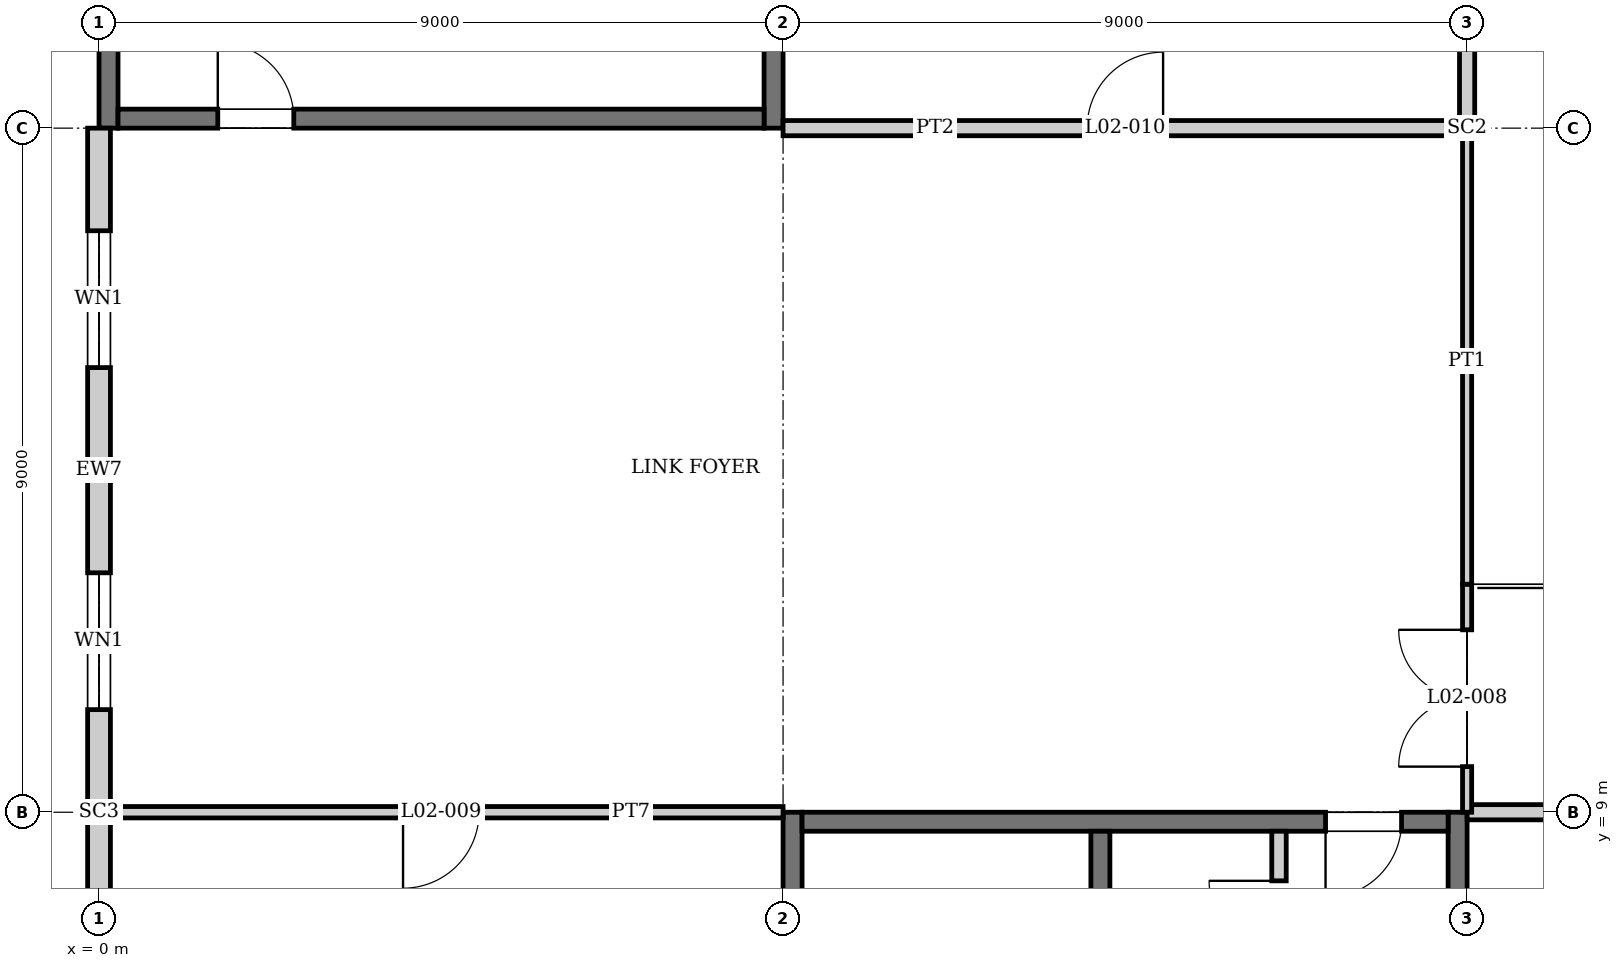
"""IFC4 building model, lengths in metres.
Left out: names, types, materials, properties, quantities, classifications, styles, units other than length and angle.
Written with IfcOpenShell. Run it as: python <this file> out.ifc"""

import sys

from ifc_helpers import new_model, si_unit, direction, frame, frame_2d, origin, origin_2d, place, context, subcontext, project, spatial, rectangle, i_section, extrude, element, fill, save


model = new_model("IFC4")
c1 = context("Model", 3, precision=1e-05, world=origin(), true_north=direction((0.0, 1.0)))
c2 = subcontext(c1, "Body", "Model", "MODEL_VIEW")
j1 = project(units=[si_unit("LENGTHUNIT", "METRE"), si_unit("PLANEANGLEUNIT", "RADIAN")], contexts=[c1])
p1 = place(None, origin())
s1 = spatial("IfcSite", under=j1, at=p1, CompositionType="ELEMENT")
p2 = place(p1, origin())
s2 = spatial("IfcBuilding", under=s1, at=p2, CompositionType="ELEMENT")
p3 = place(p2, frame((0.0, 0.0, 10.5)))
s3 = spatial("IfcBuildingStorey", under=s2, at=p3, CompositionType="ELEMENT", Elevation=10.5)
p4 = place(p3, frame((0.0, 9.0, 0.0), z_axis=(0.0, 0.0, 1.0), x_axis=(0.0, 1.0, 0.0)))
e1 = element("IfcColumn", 1, at=p4, inside=s3, PredefinedType="COLUMN", context=c2, shape_type="SweptSolid", body=[
    extrude(i_section(OverallWidth=0.254, OverallDepth=0.254, WebThickness=0.009, FlangeThickness=0.014, at=origin_2d()), origin(), (0.0, 0.0, 1.0), 4.5),
])
p5 = place(p3, frame((18.0, 18.0, 0.0), z_axis=(0.0, 0.0, 1.0), x_axis=(0.0, 1.0, 0.0)))
e2 = element("IfcColumn", 2, at=p5, inside=s3, PredefinedType="COLUMN", context=c2, shape_type="SweptSolid", body=[
    extrude(i_section(OverallWidth=0.256, OverallDepth=0.26, WebThickness=0.01, FlangeThickness=0.017, at=origin_2d()), origin(), (0.0, 0.0, 1.0), 4.5),
])
for number, where, z_axis, x_axis in (
    (3, (9.125, 0.0, 0.0), (0.0, 0.0, 1.0), (0.0, 1.0, 0.0)),
    (4, (17.875, 0.0, 0.0), (0.0, 0.0, 1.0), (0.0, 1.0, 0.0)),
):
    element("IfcWall", number, at=place(p3, frame(where, z_axis=z_axis, x_axis=x_axis)), inside=s3, PredefinedType="SHEAR", context=c2, shape_type="SweptSolid", body=[
        extrude(rectangle(XDim=9.0, YDim=0.25, at=frame_2d((4.5, 0.0))), origin(), (0.0, 0.0, 1.0), 4.35),
    ])
p6 = place(p3, frame((9.25, 8.875, 0.0), z_axis=(0.0, 0.0, 1.0), x_axis=(1.0, 0.0, 0.0)))
e5 = element("IfcWall", 5, at=p6, inside=s3, PredefinedType="SHEAR", context=c2, shape_type="SweptSolid", body=[
    extrude(rectangle(XDim=8.5, YDim=0.25, at=frame_2d((4.25, 0.0))), origin(), (0.0, 0.0, 1.0), 4.35),
])
p7 = place(p6, frame((6.887, 0.0, 0.0)))
e6 = element("IfcOpeningElement", 6, at=p7, cuts=e5, PredefinedType="OPENING", context=c2, shape_type="SweptSolid", body=[
    extrude(rectangle(XDim=1.0, YDim=2.1, at=frame_2d((0.5, 1.05))), frame((0.0, 0.135, 0.0), z_axis=(0.0, -1.0, 0.0), x_axis=(1.0, 0.0, 0.0)), (0.0, 0.0, 1.0), 0.27),
])
for number, where, z_axis, x_axis in (
    (7, (0.125, 18.0, 0.0), (0.0, 0.0, 1.0), (0.0, 1.0, 0.0)),
    (8, (8.875, 18.0, 0.0), (0.0, 0.0, 1.0), (0.0, 1.0, 0.0)),
):
    element("IfcWall", number, at=place(p3, frame(where, z_axis=z_axis, x_axis=x_axis)), inside=s3, PredefinedType="SHEAR", context=c2, shape_type="SweptSolid", body=[
        extrude(rectangle(XDim=9.0, YDim=0.25, at=frame_2d((4.5, 0.0))), origin(), (0.0, 0.0, 1.0), 4.35),
    ])
p8 = place(p3, frame((0.25, 18.125, 0.0), z_axis=(0.0, 0.0, 1.0), x_axis=(1.0, 0.0, 0.0)))
e9 = element("IfcWall", 9, at=p8, inside=s3, PredefinedType="SHEAR", context=c2, shape_type="SweptSolid", body=[
    extrude(rectangle(XDim=8.5, YDim=0.25, at=frame_2d((4.25, 0.0))), origin(), (0.0, 0.0, 1.0), 4.35),
])
p9 = place(p8, frame((1.312, 0.0, 0.0)))
e10 = element("IfcOpeningElement", 10, at=p9, cuts=e9, PredefinedType="OPENING", context=c2, shape_type="SweptSolid", body=[
    extrude(rectangle(XDim=1.0, YDim=2.1, at=frame_2d((0.5, 1.05))), frame((0.0, 0.135, 0.0), z_axis=(0.0, -1.0, 0.0), x_axis=(1.0, 0.0, 0.0)), (0.0, 0.0, 1.0), 0.27),
])
p10 = place(p3, frame((0.0, 0.127, 0.0), z_axis=(0.0, 0.0, 1.0), x_axis=(0.0, 1.0, 0.0)))
e11 = element("IfcWall", 11, at=p10, inside=s3, PredefinedType="SOLIDWALL", context=c2, shape_type="SweptSolid", body=[
    extrude(rectangle(XDim=8.746, YDim=0.3, at=frame_2d((4.373, 0.0))), origin(), (0.0, 0.0, 1.0), 3.991),
])
p11 = place(p10, frame((0.923, 0.0, 0.9)))
e12 = element("IfcOpeningElement", 12, at=p11, cuts=e11, PredefinedType="OPENING", context=c2, shape_type="SweptSolid", body=[
    extrude(rectangle(XDim=2.4, YDim=2.1, at=frame_2d((1.2, 1.05))), frame((0.0, 0.16, 0.0), z_axis=(0.0, -1.0, 0.0), x_axis=(1.0, 0.0, 0.0)), (0.0, 0.0, 1.0), 0.32),
])
p12 = place(p10, frame((5.423, 0.0, 0.9)))
e13 = element("IfcOpeningElement", 13, at=p12, cuts=e11, PredefinedType="OPENING", context=c2, shape_type="SweptSolid", body=[
    extrude(rectangle(XDim=2.4, YDim=2.1, at=frame_2d((1.2, 1.05))), frame((0.0, 0.16, 0.0), z_axis=(0.0, -1.0, 0.0), x_axis=(1.0, 0.0, 0.0)), (0.0, 0.0, 1.0), 0.32),
])
p13 = place(p3, frame((0.0, 9.127, 0.0), z_axis=(0.0, 0.0, 1.0), x_axis=(0.0, 1.0, 0.0)))
e14 = element("IfcWall", 14, at=p13, inside=s3, PredefinedType="SOLIDWALL", context=c2, shape_type="SweptSolid", body=[
    extrude(rectangle(XDim=8.873, YDim=0.3, at=frame_2d((4.437, 0.0))), origin(), (0.0, 0.0, 1.0), 3.991),
])
p14 = place(p13, frame((1.223, 0.0, 0.9)))
e15 = element("IfcOpeningElement", 15, at=p14, cuts=e14, PredefinedType="OPENING", context=c2, shape_type="SweptSolid", body=[
    extrude(rectangle(XDim=1.8, YDim=2.4, at=frame_2d((0.9, 1.2))), frame((0.0, 0.16, 0.0), z_axis=(0.0, -1.0, 0.0), x_axis=(1.0, 0.0, 0.0)), (0.0, 0.0, 1.0), 0.32),
])
p15 = place(p13, frame((5.723, 0.0, 0.9)))
e16 = element("IfcOpeningElement", 16, at=p15, cuts=e14, PredefinedType="OPENING", context=c2, shape_type="SweptSolid", body=[
    extrude(rectangle(XDim=1.8, YDim=2.4, at=frame_2d((0.9, 1.2))), frame((0.0, 0.16, 0.0), z_axis=(0.0, -1.0, 0.0), x_axis=(1.0, 0.0, 0.0)), (0.0, 0.0, 1.0), 0.32),
])
p16 = place(p3, frame((13.175, 0.25, 0.0), z_axis=(0.0, 0.0, 1.0), x_axis=(0.0, 1.0, 0.0)))
e17 = element("IfcWall", 17, at=p16, inside=s3, PredefinedType="SOLIDWALL", context=c2, shape_type="SweptSolid", body=[
    extrude(rectangle(XDim=8.5, YDim=0.25, at=frame_2d((4.25, 0.0))), origin(), (0.0, 0.0, 1.0), 4.35),
])
p17 = place(p16, frame((0.35, 0.0, 0.0)))
e18 = element("IfcOpeningElement", 18, at=p17, cuts=e17, PredefinedType="OPENING", context=c2, shape_type="SweptSolid", body=[
    extrude(rectangle(XDim=1.1, YDim=2.1, at=frame_2d((0.55, 1.05))), frame((0.0, 0.135, 0.0), z_axis=(0.0, -1.0, 0.0), x_axis=(1.0, 0.0, 0.0)), (0.0, 0.0, 1.0), 0.27),
])
p18 = place(p3, frame((0.127, 9.0, 0.0), z_axis=(0.0, 0.0, 1.0), x_axis=(1.0, 0.0, 0.0)))
e19 = element("IfcWall", 19, at=p18, inside=s3, PredefinedType="PARTITIONING", context=c2, shape_type="SweptSolid", body=[
    extrude(rectangle(XDim=8.873, YDim=0.15, at=frame_2d((4.437, 0.0))), origin(), (0.0, 0.0, 1.0), 3.822),
])
p19 = place(p18, frame((3.873, 0.0, 0.0)))
e20 = element("IfcOpeningElement", 20, at=p19, cuts=e19, PredefinedType="OPENING", context=c2, shape_type="SweptSolid", body=[
    extrude(rectangle(XDim=1.0, YDim=2.1, at=frame_2d((0.5, 1.05))), frame((0.0, 0.085, 0.0), z_axis=(0.0, -1.0, 0.0), x_axis=(1.0, 0.0, 0.0)), (0.0, 0.0, 1.0), 0.17),
])
p20 = place(p3, frame((18.0, 9.0, 0.0), z_axis=(0.0, 0.0, 1.0), x_axis=(1.0, 0.0, 0.0)))
e21 = element("IfcWall", 21, at=p20, inside=s3, PredefinedType="PARTITIONING", context=c2, shape_type="SweptSolid", body=[
    extrude(rectangle(XDim=8.846, YDim=0.2, at=frame_2d((4.423, 0.0))), origin(), (0.0, 0.0, 1.0), 2.414),
])
p21 = place(p20, frame((3.9, 0.0, 0.0)))
e22 = element("IfcOpeningElement", 22, at=p21, cuts=e21, PredefinedType="OPENING", context=c2, shape_type="SweptSolid", body=[
    extrude(rectangle(XDim=1.2, YDim=2.1, at=frame_2d((0.6, 1.05))), frame((0.0, 0.11, 0.0), z_axis=(0.0, -1.0, 0.0), x_axis=(1.0, 0.0, 0.0)), (0.0, 0.0, 1.0), 0.22),
])
p22 = place(p3, frame((9.0, 18.0, 0.0), z_axis=(0.0, 0.0, 1.0), x_axis=(1.0, 0.0, 0.0)))
e23 = element("IfcWall", 23, at=p22, inside=s3, PredefinedType="PARTITIONING", context=c2, shape_type="SweptSolid", body=[
    extrude(rectangle(XDim=8.87, YDim=0.2, at=frame_2d((4.435, 0.0))), origin(), (0.0, 0.0, 1.0), 3.822),
])
p23 = place(p22, frame((4.0, 0.0, 0.0)))
e24 = element("IfcOpeningElement", 24, at=p23, cuts=e23, PredefinedType="OPENING", context=c2, shape_type="SweptSolid", body=[
    extrude(rectangle(XDim=1.0, YDim=2.1, at=frame_2d((0.5, 1.05))), frame((0.0, 0.11, 0.0), z_axis=(0.0, -1.0, 0.0), x_axis=(1.0, 0.0, 0.0)), (0.0, 0.0, 1.0), 0.22),
])
p24 = place(p3, frame((15.525, 6.4, 0.0), z_axis=(0.0, 0.0, 1.0), x_axis=(0.0, 1.0, 0.0)))
e25 = element("IfcWall", 25, at=p24, inside=s3, PredefinedType="PARTITIONING", context=c2, shape_type="SweptSolid", body=[
    extrude(rectangle(XDim=2.35, YDim=0.19, at=frame_2d((1.175, 0.0))), origin(), (0.0, 0.0, 1.0), 4.35),
])
p25 = place(p24, frame((0.778, 0.0, 0.0)))
e26 = element("IfcOpeningElement", 26, at=p25, cuts=e25, PredefinedType="OPENING", context=c2, shape_type="SweptSolid", body=[
    extrude(rectangle(XDim=0.92, YDim=2.1, at=frame_2d((0.46, 1.05))), frame((0.0, 0.105, 0.0), z_axis=(0.0, -1.0, 0.0), x_axis=(1.0, 0.0, 0.0)), (0.0, 0.0, 1.0), 0.21),
])
p26 = place(p3, frame((18.0, 9.0, 0.0), z_axis=(0.0, 0.0, 1.0), x_axis=(0.0, 1.0, 0.0)))
e27 = element("IfcWall", 27, at=p26, inside=s3, PredefinedType="PARTITIONING", context=c2, shape_type="SweptSolid", body=[
    extrude(rectangle(XDim=3.0, YDim=0.12, at=frame_2d((1.5, 0.0))), origin(), (0.0, 0.0, 1.0), 2.414),
])
p27 = place(p26, frame((0.6, 0.0, 0.0)))
e28 = element("IfcOpeningElement", 28, at=p27, cuts=e27, PredefinedType="OPENING", context=c2, shape_type="SweptSolid", body=[
    extrude(rectangle(XDim=1.8, YDim=2.1, at=frame_2d((0.9, 1.05))), frame((0.0, 0.07, 0.0), z_axis=(0.0, -1.0, 0.0), x_axis=(1.0, 0.0, 0.0)), (0.0, 0.0, 1.0), 0.14),
])
p28 = place(p3, frame((18.0, 12.0, 0.0), z_axis=(0.0, 0.0, 1.0), x_axis=(0.0, 1.0, 0.0)))
e29 = element("IfcWall", 29, at=p28, inside=s3, PredefinedType="PARTITIONING", context=c2, shape_type="SweptSolid", body=[
    extrude(rectangle(XDim=5.87, YDim=0.12, at=frame_2d((2.935, 0.0))), origin(), (0.0, 0.0, 1.0), 4.35),
])
p29 = place(p3, frame((18.0, 18.13, 0.0), z_axis=(0.0, 0.0, 1.0), x_axis=(0.0, 1.0, 0.0)))
e30 = element("IfcWall", 30, at=p29, inside=s3, PredefinedType="PARTITIONING", context=c2, shape_type="SweptSolid", body=[
    extrude(rectangle(XDim=8.716, YDim=0.2, at=frame_2d((4.358, 0.0))), origin(), (0.0, 0.0, 1.0), 4.35),
])
p30 = place(p14, origin())
e31 = element("IfcWindow", 31, at=p30, inside=s3, PartitioningType="SINGLE_PANEL", PredefinedType="WINDOW", context=c2, shape_type="SweptSolid", body=[
    extrude(rectangle(XDim=1.8, YDim=2.4, at=frame_2d((0.9, 1.2))), frame((0.0, 0.03, 0.0), z_axis=(0.0, -1.0, 0.0), x_axis=(1.0, 0.0, 0.0)), (0.0, 0.0, 1.0), 0.06),
])
fill(e15, e31)
p31 = place(p15, origin())
e32 = element("IfcWindow", 32, at=p31, inside=s3, PartitioningType="SINGLE_PANEL", PredefinedType="WINDOW", context=c2, shape_type="SweptSolid", body=[
    extrude(rectangle(XDim=1.8, YDim=2.4, at=frame_2d((0.9, 1.2))), frame((0.0, 0.03, 0.0), z_axis=(0.0, -1.0, 0.0), x_axis=(1.0, 0.0, 0.0)), (0.0, 0.0, 1.0), 0.06),
])
fill(e16, e32)
p32 = place(p27, origin())
e33 = element("IfcDoor", 33, at=p32, inside=s3, OperationType="DOUBLE_DOOR_SINGLE_SWING", PredefinedType="DOOR", context=c2, shape_type="SweptSolid", body=[
    extrude(rectangle(XDim=1.8, YDim=2.1, at=frame_2d((0.9, 1.05))), frame((0.0, 0.025, 0.0), z_axis=(0.0, -1.0, 0.0), x_axis=(1.0, 0.0, 0.0)), (0.0, 0.0, 1.0), 0.05),
])
fill(e28, e33)
p33 = place(p19, frame((1.0, 0.0, 0.0), z_axis=(0.0, 0.0, 1.0), x_axis=(-1.0, 0.0, 0.0)))
e34 = element("IfcDoor", 34, at=p33, inside=s3, OperationType="SINGLE_SWING_RIGHT", PredefinedType="DOOR", context=c2, shape_type="SweptSolid", body=[
    extrude(rectangle(XDim=1.0, YDim=2.1, at=frame_2d((0.5, 1.05))), frame((0.0, 0.025, 0.0), z_axis=(0.0, -1.0, 0.0), x_axis=(1.0, 0.0, 0.0)), (0.0, 0.0, 1.0), 0.05),
])
fill(e20, e34)
p34 = place(p23, origin())
e35 = element("IfcDoor", 35, at=p34, inside=s3, OperationType="SINGLE_SWING_RIGHT", PredefinedType="DOOR", context=c2, shape_type="SweptSolid", body=[
    extrude(rectangle(XDim=1.0, YDim=2.1, at=frame_2d((0.5, 1.05))), frame((0.0, 0.025, 0.0), z_axis=(0.0, -1.0, 0.0), x_axis=(1.0, 0.0, 0.0)), (0.0, 0.0, 1.0), 0.05),
])
fill(e24, e35)
p35 = place(p7, frame((1.0, 0.0, 0.0), z_axis=(0.0, 0.0, 1.0), x_axis=(-1.0, 0.0, 0.0)))
e36 = element("IfcDoor", 36, at=p35, inside=s3, OperationType="SINGLE_SWING_RIGHT", PredefinedType="DOOR", context=c2, shape_type="SweptSolid", body=[
    extrude(rectangle(XDim=1.0, YDim=2.1, at=frame_2d((0.5, 1.05))), frame((0.0, 0.025, 0.0), z_axis=(0.0, -1.0, 0.0), x_axis=(1.0, 0.0, 0.0)), (0.0, 0.0, 1.0), 0.05),
])
fill(e6, e36)
p36 = place(p25, origin())
e37 = element("IfcDoor", 37, at=p36, inside=s3, OperationType="SINGLE_SWING_RIGHT", PredefinedType="DOOR", context=c2, shape_type="SweptSolid", body=[
    extrude(rectangle(XDim=0.92, YDim=2.1, at=frame_2d((0.46, 1.05))), frame((0.0, 0.025, 0.0), z_axis=(0.0, -1.0, 0.0), x_axis=(1.0, 0.0, 0.0)), (0.0, 0.0, 1.0), 0.05),
])
fill(e26, e37)
p37 = place(p9, origin())
e38 = element("IfcDoor", 38, at=p37, inside=s3, OperationType="SINGLE_SWING_LEFT", PredefinedType="DOOR", context=c2, shape_type="SweptSolid", body=[
    extrude(rectangle(XDim=1.0, YDim=2.1, at=frame_2d((0.5, 1.05))), frame((0.0, 0.025, 0.0), z_axis=(0.0, -1.0, 0.0), x_axis=(1.0, 0.0, 0.0)), (0.0, 0.0, 1.0), 0.05),
])
fill(e10, e38)
save(model, sys.argv[1])
